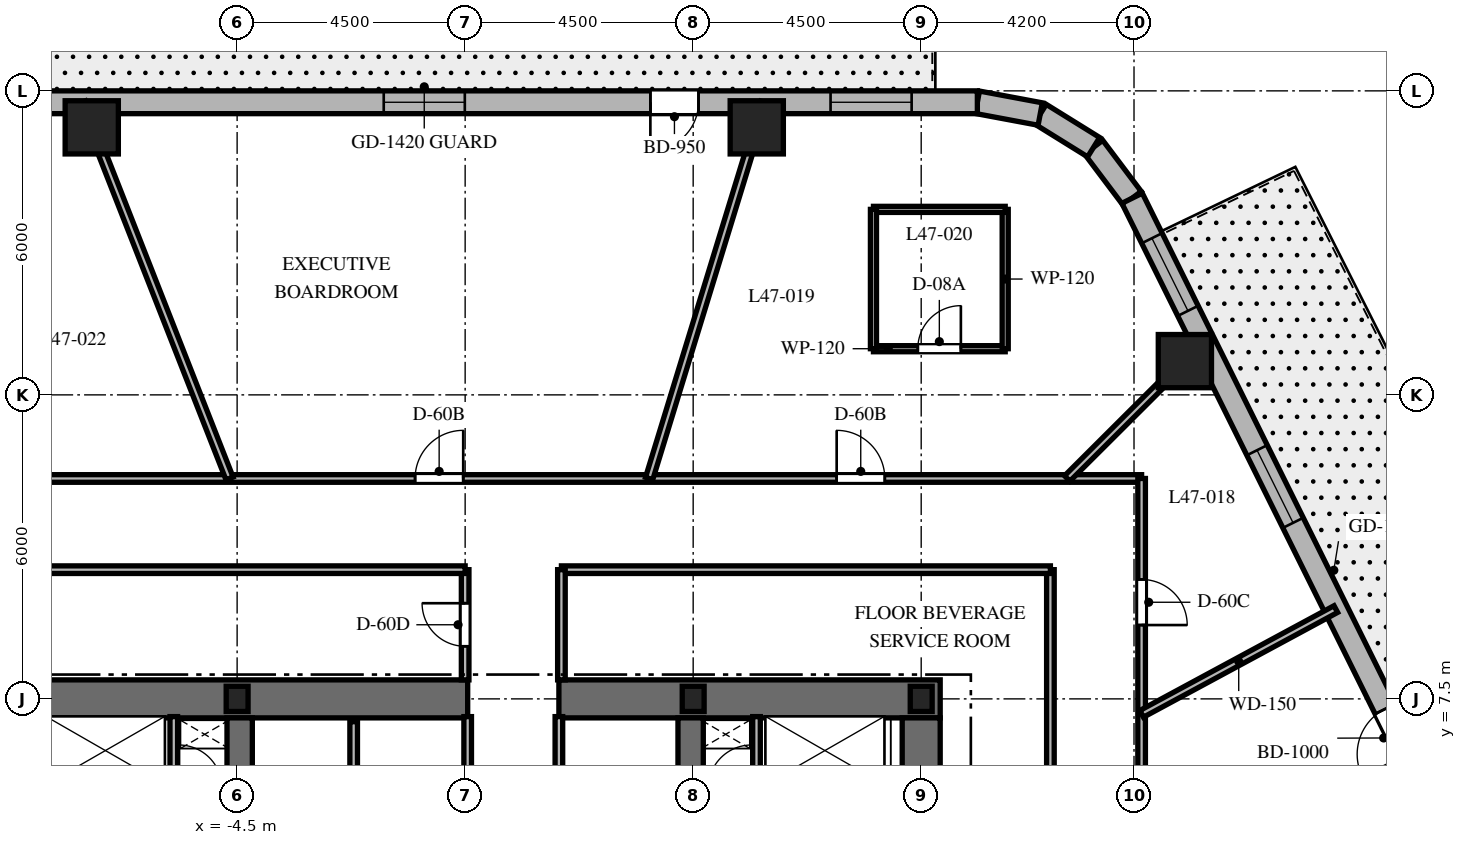
"""IFC4 building model, lengths in metres.
Left out: names, types, materials, properties, quantities, classifications, styles, units other than length and angle.
Written with IfcOpenShell. Run it as: python <this file> out.ifc"""

import sys

from ifc_helpers import new_model, si_unit, direction, frame, frame_2d, origin, origin_2d, place, context, subcontext, project, spatial, rectangle, i_section, extrude, element, fill, save


model = new_model("IFC4")
c1 = context("Model", 3, precision=1e-05, world=origin(), true_north=direction((0.0, 1.0)))
c2 = subcontext(c1, "Body", "Model", "MODEL_VIEW")
j1 = project(units=[si_unit("LENGTHUNIT", "METRE"), si_unit("PLANEANGLEUNIT", "RADIAN")], contexts=[c1])
p1 = place(None, origin())
s1 = spatial("IfcSite", under=j1, at=p1, CompositionType="ELEMENT")
p2 = place(p1, origin())
s2 = spatial("IfcBuilding", under=s1, at=p2, CompositionType="ELEMENT")
p3 = place(p2, frame((0.0, 0.0, 190.4)))
s3 = spatial("IfcBuildingStorey", under=s2, at=p3, CompositionType="ELEMENT", Elevation=190.4)
p4 = place(p3, frame((-9.375, 7.5, 0.0), z_axis=(0.0, 0.0, 1.0), x_axis=(1.0, 0.0, 0.0)))
e1 = element("IfcWall", 1, at=p4, inside=s3, PredefinedType="SHEAR", context=c2, shape_type="SweptSolid", body=[
    extrude(rectangle(XDim=9.425, YDim=0.75, at=frame_2d((4.712, 0.0))), origin(), (0.0, 0.0, 1.0), 3.7),
])
p5 = place(p3, frame((1.85, 7.5, 0.0), z_axis=(0.0, 0.0, 1.0), x_axis=(1.0, 0.0, 0.0)))
e2 = element("IfcWall", 2, at=p5, inside=s3, PredefinedType="SHEAR", context=c2, shape_type="SweptSolid", body=[
    extrude(rectangle(XDim=7.525, YDim=0.75, at=frame_2d((3.762, 0.0))), origin(), (0.0, 0.0, 1.0), 3.7),
])
p6 = place(p3, frame((9.0, -7.125, 0.0), z_axis=(0.0, 0.0, 1.0), x_axis=(0.0, 1.0, 0.0)))
e3 = element("IfcWall", 3, at=p6, inside=s3, PredefinedType="SHEAR", context=c2, shape_type="SweptSolid", body=[
    extrude(rectangle(XDim=14.25, YDim=0.75, at=frame_2d((7.125, 0.0))), origin(), (0.0, 0.0, 1.0), 3.7),
])
p7 = place(p6, frame((10.25, 0.0, 0.0)))
e4 = element("IfcOpeningElement", 4, at=p7, cuts=e3, PredefinedType="OPENING", context=c2, shape_type="SweptSolid", body=[
    extrude(rectangle(XDim=1.05, YDim=2.15, at=frame_2d((0.525, 1.075))), frame((0.0, 0.385, 0.0), z_axis=(0.0, -1.0, 0.0), x_axis=(1.0, 0.0, 0.0)), (0.0, 0.0, 1.0), 0.77),
])
for number, where, z_axis, x_axis in (
    (5, (-4.45, 2.25, 0.0), (0.0, 0.0, 1.0), (0.0, 1.0, 0.0)),
    (6, (4.45, 2.25, 0.0), (0.0, 0.0, 1.0), (0.0, 1.0, 0.0)),
):
    element("IfcWall", number, at=place(p3, frame(where, z_axis=z_axis, x_axis=x_axis)), inside=s3, PredefinedType="SHEAR", context=c2, shape_type="SweptSolid", body=[
        extrude(rectangle(XDim=4.875, YDim=0.5, at=frame_2d((2.438, 0.0))), origin(), (0.0, 0.0, 1.0), 3.7),
    ])
for number, where, z_axis, x_axis in (
    (7, (9.0, 7.5, 0.0), (0.0, 0.0, 1.0), (1.0, 0.0, 0.0)),
    (8, (4.5, 7.5, 0.0), (0.0, 0.0, 1.0), (1.0, 0.0, 0.0)),
    (9, (-4.5, 7.5, 0.0), (0.0, 0.0, 1.0), (1.0, 0.0, 0.0)),
):
    element("IfcColumn", number, at=place(p3, frame(where, z_axis=z_axis, x_axis=x_axis)), inside=s3, PredefinedType="COLUMN", context=c2, shape_type="SweptSolid", body=[
        extrude(i_section(OverallWidth=0.432, OverallDepth=0.498, WebThickness=0.056, FlangeThickness=0.089, at=origin_2d()), origin(), (0.0, 0.0, 1.0), 3.7),
    ])
for number, where, z_axis, x_axis in (
    (10, (14.204, 14.166, 0.0), (0.0, 0.0, 1.0), (1.0, 0.0, 0.0)),
    (11, (5.755, 18.78, 0.0), (0.0, 0.0, 1.0), (1.0, 0.0, 0.0)),
    (12, (-7.369, 18.78, 0.0), (0.0, 0.0, 1.0), (1.0, 0.0, 0.0)),
):
    element("IfcColumn", number, at=place(p3, frame(where, z_axis=z_axis, x_axis=x_axis)), inside=s3, PredefinedType="COLUMN", context=c2, shape_type="SweptSolid", body=[
        extrude(rectangle(XDim=1.05, YDim=1.05, at=origin_2d()), origin(), (0.0, 0.0, 1.0), 3.7),
    ])
p8 = place(p3, frame((13.162, 17.381, 0.0), z_axis=(0.0, 0.0, 1.0), x_axis=(-0.601515770517, 0.798860925205, 0.0)))
e13 = element("IfcWall", 13, at=p8, inside=s3, PredefinedType="SOLIDWALL", context=c2, shape_type="SweptSolid", body=[
    extrude(rectangle(XDim=1.262, YDim=0.45, at=frame_2d((0.631, 0.0))), origin(), (0.0, 0.0, 1.0), 3.4),
])
p9 = place(p3, frame((12.403, 18.389, 0.0), z_axis=(0.0, 0.0, 1.0), x_axis=(-0.849795170926, 0.527113049991, 0.0)))
e14 = element("IfcWall", 14, at=p9, inside=s3, PredefinedType="SOLIDWALL", context=c2, shape_type="SweptSolid", body=[
    extrude(rectangle(XDim=1.241, YDim=0.45, at=frame_2d((0.62, 0.0))), origin(), (0.0, 0.0, 1.0), 3.4),
])
p10 = place(p3, frame((11.349, 19.043, 0.0), z_axis=(0.0, 0.0, 1.0), x_axis=(-0.982931267051, 0.183973161772, 0.0)))
e15 = element("IfcWall", 15, at=p10, inside=s3, PredefinedType="SOLIDWALL", context=c2, shape_type="SweptSolid", body=[
    extrude(rectangle(XDim=1.262, YDim=0.45, at=frame_2d((0.631, 0.0))), origin(), (0.0, 0.0, 1.0), 3.4),
])
p11 = place(p3, frame((20.618, 2.344, 0.0), z_axis=(0.0, 0.0, 1.0), x_axis=(-0.444243691097, 0.895905990002, 0.0)))
e16 = element("IfcWall", 16, at=p11, inside=s3, PredefinedType="SOLIDWALL", context=c2, shape_type="SweptSolid", body=[
    extrude(rectangle(XDim=16.784, YDim=0.45, at=frame_2d((8.392, 0.0))), origin(), (0.0, 0.0, 1.0), 3.4),
])
p12 = place(p11, frame((4.535, 0.0, 0.0)))
e17 = element("IfcOpeningElement", 17, at=p12, cuts=e16, PredefinedType="OPENING", context=c2, shape_type="SweptSolid", body=[
    extrude(rectangle(XDim=1.0, YDim=2.15, at=frame_2d((0.5, 1.075))), frame((0.0, 0.235, 0.0), z_axis=(0.0, -1.0, 0.0), x_axis=(1.0, 0.0, 0.0)), (0.0, 0.0, 1.0), 0.47),
])
p13 = place(p11, frame((9.633, 0.0, 0.8)))
e18 = element("IfcOpeningElement", 18, at=p13, cuts=e16, PredefinedType="OPENING", context=c2, shape_type="SweptSolid", body=[
    extrude(rectangle(XDim=1.6, YDim=1.75, at=frame_2d((0.8, 0.875))), frame((0.0, 0.235, 0.0), z_axis=(0.0, -1.0, 0.0), x_axis=(1.0, 0.0, 0.0)), (0.0, 0.0, 1.0), 0.47),
])
p14 = place(p11, frame((14.303, 0.0, 0.8)))
e19 = element("IfcOpeningElement", 19, at=p14, cuts=e16, PredefinedType="OPENING", context=c2, shape_type="SweptSolid", body=[
    extrude(rectangle(XDim=1.6, YDim=1.75, at=frame_2d((0.8, 0.875))), frame((0.0, 0.235, 0.0), z_axis=(0.0, -1.0, 0.0), x_axis=(1.0, 0.0, 0.0)), (0.0, 0.0, 1.0), 0.47),
])
p15 = place(p11, frame((0.931, 0.0, 0.8)))
e20 = element("IfcOpeningElement", 20, at=p15, cuts=e16, PredefinedType="OPENING", context=c2, shape_type="SweptSolid", body=[
    extrude(rectangle(XDim=1.6, YDim=1.75, at=frame_2d((0.8, 0.875))), frame((0.0, 0.235, 0.0), z_axis=(0.0, -1.0, 0.0), x_axis=(1.0, 0.0, 0.0)), (0.0, 0.0, 1.0), 0.47),
])
p16 = place(p3, frame((10.108, 19.275, 0.0), z_axis=(0.0, 0.0, 1.0), x_axis=(-1.0, 0.0, 0.0)))
e21 = element("IfcWall", 21, at=p16, inside=s3, PredefinedType="SOLIDWALL", context=c2, shape_type="SweptSolid", body=[
    extrude(rectangle(XDim=21.829, YDim=0.45, at=frame_2d((10.915, 0.0))), origin(), (0.0, 0.0, 1.0), 3.4),
])
p17 = place(p16, frame((5.503, 0.0, 0.0)))
e22 = element("IfcOpeningElement", 22, at=p17, cuts=e21, PredefinedType="OPENING", context=c2, shape_type="SweptSolid", body=[
    extrude(rectangle(XDim=0.95, YDim=2.15, at=frame_2d((0.475, 1.075))), frame((0.0, 0.235, 0.0), z_axis=(0.0, -1.0, 0.0), x_axis=(1.0, 0.0, 0.0)), (0.0, 0.0, 1.0), 0.47),
])
p18 = place(p16, frame((1.297, 0.0, 0.8)))
e23 = element("IfcOpeningElement", 23, at=p18, cuts=e21, PredefinedType="OPENING", context=c2, shape_type="SweptSolid", body=[
    extrude(rectangle(XDim=1.6, YDim=1.75, at=frame_2d((0.8, 0.875))), frame((0.0, 0.235, 0.0), z_axis=(0.0, -1.0, 0.0), x_axis=(1.0, 0.0, 0.0)), (0.0, 0.0, 1.0), 0.47),
])
p19 = place(p16, frame((10.115, 0.0, 0.8)))
e24 = element("IfcOpeningElement", 24, at=p19, cuts=e21, PredefinedType="OPENING", context=c2, shape_type="SweptSolid", body=[
    extrude(rectangle(XDim=1.6, YDim=1.75, at=frame_2d((0.8, 0.875))), frame((0.0, 0.235, 0.0), z_axis=(0.0, -1.0, 0.0), x_axis=(1.0, 0.0, 0.0)), (0.0, 0.0, 1.0), 0.47),
])
p20 = place(p16, frame((18.933, 0.0, 0.8)))
e25 = element("IfcOpeningElement", 25, at=p20, cuts=e21, PredefinedType="OPENING", context=c2, shape_type="SweptSolid", body=[
    extrude(rectangle(XDim=1.6, YDim=1.75, at=frame_2d((0.8, 0.875))), frame((0.0, 0.235, 0.0), z_axis=(0.0, -1.0, 0.0), x_axis=(1.0, 0.0, 0.0)), (0.0, 0.0, 1.0), 0.47),
])
for number, where, z_axis, x_axis in (
    (26, (-5.75, 5.74, 0.0), (0.0, 0.0, 1.0), (0.0, 1.0, 0.0)),
    (27, (5.75, 5.74, 0.0), (0.0, 0.0, 1.0), (0.0, 1.0, 0.0)),
):
    element("IfcWall", number, at=place(p3, frame(where, z_axis=z_axis, x_axis=x_axis)), inside=s3, PredefinedType="PARTITIONING", context=c2, shape_type="SweptSolid", body=[
        extrude(rectangle(XDim=1.41, YDim=0.15, at=frame_2d((0.705, 0.0))), origin(), (0.0, 0.0, 1.0), 3.4),
    ])
p21 = place(p3, frame((-2.2, 5.2, 0.0), z_axis=(0.0, 0.0, 1.0), x_axis=(0.0, 1.0, 0.0)))
e28 = element("IfcWall", 28, at=p21, inside=s3, PredefinedType="PARTITIONING", context=c2, shape_type="SweptSolid", body=[
    extrude(rectangle(XDim=1.85, YDim=0.15, at=frame_2d((0.925, 0.0))), origin(), (0.0, 0.0, 1.0), 3.4),
])
for number, where, z_axis, x_axis in (
    (29, (0.05, 5.2, 0.0), (0.0, 0.0, 1.0), (0.0, 1.0, 0.0)),
    (30, (1.85, 5.2, 0.0), (0.0, 0.0, 1.0), (0.0, 1.0, 0.0)),
):
    element("IfcWall", number, at=place(p3, frame(where, z_axis=z_axis, x_axis=x_axis)), inside=s3, PredefinedType="PARTITIONING", context=c2, shape_type="SweptSolid", body=[
        extrude(rectangle(XDim=1.95, YDim=0.15, at=frame_2d((0.975, 0.0))), origin(), (0.0, 0.0, 1.0), 3.4),
    ])
p22 = place(p3, frame((-13.35, 11.85, 0.0), z_axis=(0.0, 0.0, 1.0), x_axis=(1.0, 0.0, 0.0)))
e31 = element("IfcWall", 31, at=p22, inside=s3, PredefinedType="PARTITIONING", context=c2, shape_type="SweptSolid", body=[
    extrude(rectangle(XDim=26.7, YDim=0.15, at=frame_2d((13.35, 0.0))), origin(), (0.0, 0.0, 1.0), 2.84),
])
p23 = place(p22, frame((20.682, 0.0, 0.0)))
e32 = element("IfcOpeningElement", 32, at=p23, cuts=e31, PredefinedType="OPENING", context=c2, shape_type="SweptSolid", body=[
    extrude(rectangle(XDim=0.95, YDim=2.03, at=frame_2d((0.475, 1.015))), frame((0.0, 0.085, 0.0), z_axis=(0.0, -1.0, 0.0), x_axis=(1.0, 0.0, 0.0)), (0.0, 0.0, 1.0), 0.17),
])
p24 = place(p22, frame((12.362, 0.0, 0.0)))
e33 = element("IfcOpeningElement", 33, at=p24, cuts=e31, PredefinedType="OPENING", context=c2, shape_type="SweptSolid", body=[
    extrude(rectangle(XDim=0.95, YDim=2.03, at=frame_2d((0.475, 1.015))), frame((0.0, 0.085, 0.0), z_axis=(0.0, -1.0, 0.0), x_axis=(1.0, 0.0, 0.0)), (0.0, 0.0, 1.0), 0.17),
])
p25 = place(p22, frame((3.995, 0.0, 0.0)))
e34 = element("IfcOpeningElement", 34, at=p25, cuts=e31, PredefinedType="OPENING", context=c2, shape_type="SweptSolid", body=[
    extrude(rectangle(XDim=0.95, YDim=2.03, at=frame_2d((0.475, 1.015))), frame((0.0, 0.085, 0.0), z_axis=(0.0, -1.0, 0.0), x_axis=(1.0, 0.0, 0.0)), (0.0, 0.0, 1.0), 0.17),
])
p26 = place(p3, frame((13.35, 11.85, 0.0), z_axis=(0.0, 0.0, 1.0), x_axis=(0.0, -1.0, 0.0)))
e35 = element("IfcWall", 35, at=p26, inside=s3, PredefinedType="PARTITIONING", context=c2, shape_type="SweptSolid", body=[
    extrude(rectangle(XDim=23.7, YDim=0.15, at=frame_2d((11.85, 0.0))), origin(), (0.0, 0.0, 1.0), 2.84),
])
p27 = place(p26, frame((5.951, 0.0, 0.0)))
e36 = element("IfcOpeningElement", 36, at=p27, cuts=e35, PredefinedType="OPENING", context=c2, shape_type="SweptSolid", body=[
    extrude(rectangle(XDim=0.9, YDim=2.03, at=frame_2d((0.45, 1.015))), frame((0.0, 0.085, 0.0), z_axis=(0.0, -1.0, 0.0), x_axis=(1.0, 0.0, 0.0)), (0.0, 0.0, 1.0), 0.17),
])
p28 = place(p26, frame((1.993, 0.0, 0.0)))
e37 = element("IfcOpeningElement", 37, at=p28, cuts=e35, PredefinedType="OPENING", context=c2, shape_type="SweptSolid", body=[
    extrude(rectangle(XDim=0.9, YDim=2.03, at=frame_2d((0.45, 1.015))), frame((0.0, 0.085, 0.0), z_axis=(0.0, -1.0, 0.0), x_axis=(1.0, 0.0, 0.0)), (0.0, 0.0, 1.0), 0.17),
])
p29 = place(p26, frame((18.364, 0.0, 0.0)))
e38 = element("IfcOpeningElement", 38, at=p29, cuts=e35, PredefinedType="OPENING", context=c2, shape_type="SweptSolid", body=[
    extrude(rectangle(XDim=1.0, YDim=2.03, at=frame_2d((0.5, 1.015))), frame((0.0, 0.085, 0.0), z_axis=(0.0, -1.0, 0.0), x_axis=(1.0, 0.0, 0.0)), (0.0, 0.0, 1.0), 0.17),
])
p30 = place(p3, frame((11.55, 4.6, 0.0), z_axis=(0.0, 0.0, 1.0), x_axis=(0.0, 1.0, 0.0)))
e39 = element("IfcWall", 39, at=p30, inside=s3, PredefinedType="PARTITIONING", context=c2, shape_type="SweptSolid", body=[
    extrude(rectangle(XDim=5.45, YDim=0.15, at=frame_2d((2.725, 0.0))), origin(), (0.0, 0.0, 1.0), 2.84),
])
p31 = place(p3, frame((11.55, 10.05, 0.0), z_axis=(0.0, 0.0, 1.0), x_axis=(-1.0, 0.0, 0.0)))
e40 = element("IfcWall", 40, at=p31, inside=s3, PredefinedType="PARTITIONING", context=c2, shape_type="SweptSolid", body=[
    extrude(rectangle(XDim=9.65, YDim=0.15, at=frame_2d((4.825, 0.0))), origin(), (0.0, 0.0, 1.0), 2.84),
])
p32 = place(p3, frame((1.9, 10.05, 0.0), z_axis=(0.0, 0.0, 1.0), x_axis=(0.0, -1.0, 0.0)))
e41 = element("IfcWall", 41, at=p32, inside=s3, PredefinedType="PARTITIONING", context=c2, shape_type="SweptSolid", body=[
    extrude(rectangle(XDim=2.175, YDim=0.15, at=frame_2d((1.087, 0.0))), origin(), (0.0, 0.0, 1.0), 3.4),
])
p33 = place(p3, frame((0.0, 7.875, 0.0), z_axis=(0.0, 0.0, 1.0), x_axis=(0.0, 1.0, 0.0)))
e42 = element("IfcWall", 42, at=p33, inside=s3, PredefinedType="PARTITIONING", context=c2, shape_type="SweptSolid", body=[
    extrude(rectangle(XDim=2.175, YDim=0.15, at=frame_2d((1.087, 0.0))), origin(), (0.0, 0.0, 1.0), 3.4),
])
p34 = place(p33, frame((0.663, 0.0, 0.0)))
e43 = element("IfcOpeningElement", 43, at=p34, cuts=e42, PredefinedType="OPENING", context=c2, shape_type="SweptSolid", body=[
    extrude(rectangle(XDim=0.85, YDim=2.03, at=frame_2d((0.425, 1.015))), frame((0.0, 0.085, 0.0), z_axis=(0.0, -1.0, 0.0), x_axis=(1.0, 0.0, 0.0)), (0.0, 0.0, 1.0), 0.17),
])
p35 = place(p3, frame((0.0, 10.05, 0.0), z_axis=(0.0, 0.0, 1.0), x_axis=(-1.0, 0.0, 0.0)))
e44 = element("IfcWall", 44, at=p35, inside=s3, PredefinedType="PARTITIONING", context=c2, shape_type="SweptSolid", body=[
    extrude(rectangle(XDim=11.55, YDim=0.15, at=frame_2d((5.775, 0.0))), origin(), (0.0, 0.0, 1.0), 2.84),
])
p36 = place(p3, frame((13.35, 7.204, 0.0), z_axis=(0.0, 0.0, 1.0), x_axis=(0.880033329067, 0.474911928394, 0.0)))
e45 = element("IfcWall", 45, at=p36, inside=s3, PredefinedType="PARTITIONING", context=c2, shape_type="SweptSolid", body=[
    extrude(rectangle(XDim=4.355, YDim=0.15, at=frame_2d((2.178, 0.0))), origin(), (0.0, 0.0, 1.0), 2.64),
])
p37 = place(p3, frame((11.882, 11.85, 0.0), z_axis=(0.0, 0.0, 1.0), x_axis=(0.708037373639, 0.706174962407, 0.0)))
e46 = element("IfcWall", 46, at=p37, inside=s3, PredefinedType="PARTITIONING", context=c2, shape_type="SweptSolid", body=[
    extrude(rectangle(XDim=3.802, YDim=0.15, at=frame_2d((1.901, 0.0))), origin(), (0.0, 0.0, 1.0), 2.64),
])
p38 = place(p3, frame((3.631, 11.85, 0.0), z_axis=(0.0, 0.0, 1.0), x_axis=(0.293007573338, 0.956110120209, 0.0)))
e47 = element("IfcWall", 47, at=p38, inside=s3, PredefinedType="PARTITIONING", context=c2, shape_type="SweptSolid", body=[
    extrude(rectangle(XDim=7.766, YDim=0.15, at=frame_2d((3.883, 0.0))), origin(), (0.0, 0.0, 1.0), 2.64),
])
p39 = place(p3, frame((-4.65, 11.85, 0.0), z_axis=(0.0, 0.0, 1.0), x_axis=(-0.365265947993, 0.930903210456, 0.0)))
e48 = element("IfcWall", 48, at=p39, inside=s3, PredefinedType="PARTITIONING", context=c2, shape_type="SweptSolid", body=[
    extrude(rectangle(XDim=7.976, YDim=0.15, at=frame_2d((3.988, 0.0))), origin(), (0.0, 0.0, 1.0), 2.64),
])
p40 = place(p3, frame((8.058, 14.411, 0.0), z_axis=(0.0, 0.0, 1.0), x_axis=(1.0, 0.0, 0.0)))
e49 = element("IfcWall", 49, at=p40, inside=s3, PredefinedType="PARTITIONING", context=c2, shape_type="SweptSolid", body=[
    extrude(rectangle(XDim=2.6, YDim=0.12, at=frame_2d((1.3, 0.0))), origin(), (0.0, 0.0, 1.0), 3.4),
])
p41 = place(p40, frame((0.875, 0.0, 0.0)))
e50 = element("IfcOpeningElement", 50, at=p41, cuts=e49, PredefinedType="OPENING", context=c2, shape_type="SweptSolid", body=[
    extrude(rectangle(XDim=0.85, YDim=2.03, at=frame_2d((0.425, 1.015))), frame((0.0, 0.07, 0.0), z_axis=(0.0, -1.0, 0.0), x_axis=(1.0, 0.0, 0.0)), (0.0, 0.0, 1.0), 0.14),
])
p42 = place(p3, frame((10.658, 14.411, 0.0), z_axis=(0.0, 0.0, 1.0), x_axis=(0.0, 1.0, 0.0)))
e51 = element("IfcWall", 51, at=p42, inside=s3, PredefinedType="PARTITIONING", context=c2, shape_type="SweptSolid", body=[
    extrude(rectangle(XDim=2.75, YDim=0.12, at=frame_2d((1.375, 0.0))), origin(), (0.0, 0.0, 1.0), 2.64),
])
p43 = place(p3, frame((10.658, 17.161, 0.0), z_axis=(0.0, 0.0, 1.0), x_axis=(-1.0, 0.0, 0.0)))
e52 = element("IfcWall", 52, at=p43, inside=s3, PredefinedType="PARTITIONING", context=c2, shape_type="SweptSolid", body=[
    extrude(rectangle(XDim=2.6, YDim=0.12, at=frame_2d((1.3, 0.0))), origin(), (0.0, 0.0, 1.0), 2.64),
])
p44 = place(p3, frame((8.058, 17.161, 0.0), z_axis=(0.0, 0.0, 1.0), x_axis=(0.0, -1.0, 0.0)))
e53 = element("IfcWall", 53, at=p44, inside=s3, PredefinedType="PARTITIONING", context=c2, shape_type="SweptSolid", body=[
    extrude(rectangle(XDim=2.75, YDim=0.12, at=frame_2d((1.375, 0.0))), origin(), (0.0, 0.0, 1.0), 3.4),
])
p45 = place(p12, origin())
e54 = element("IfcDoor", 54, at=p45, inside=s3, OperationType="SINGLE_SWING_LEFT", PredefinedType="DOOR", context=c2, shape_type="SweptSolid", body=[
    extrude(rectangle(XDim=1.0, YDim=2.15, at=frame_2d((0.5, 1.075))), frame((0.0, 0.025, 0.0), z_axis=(0.0, -1.0, 0.0), x_axis=(1.0, 0.0, 0.0)), (0.0, 0.0, 1.0), 0.05),
])
fill(e17, e54)
p46 = place(p13, origin())
e55 = element("IfcWindow", 55, at=p46, inside=s3, PartitioningType="SINGLE_PANEL", PredefinedType="WINDOW", context=c2, shape_type="SweptSolid", body=[
    extrude(rectangle(XDim=1.6, YDim=1.75, at=frame_2d((0.8, 0.875))), frame((0.0, 0.03, 0.0), z_axis=(0.0, -1.0, 0.0), x_axis=(1.0, 0.0, 0.0)), (0.0, 0.0, 1.0), 0.06),
])
fill(e18, e55)
p47 = place(p14, origin())
e56 = element("IfcWindow", 56, at=p47, inside=s3, PartitioningType="SINGLE_PANEL", PredefinedType="WINDOW", context=c2, shape_type="SweptSolid", body=[
    extrude(rectangle(XDim=1.6, YDim=1.75, at=frame_2d((0.8, 0.875))), frame((0.0, 0.03, 0.0), z_axis=(0.0, -1.0, 0.0), x_axis=(1.0, 0.0, 0.0)), (0.0, 0.0, 1.0), 0.06),
])
fill(e19, e56)
p48 = place(p17, origin())
e57 = element("IfcDoor", 57, at=p48, inside=s3, OperationType="SINGLE_SWING_RIGHT", PredefinedType="DOOR", context=c2, shape_type="SweptSolid", body=[
    extrude(rectangle(XDim=0.95, YDim=2.15, at=frame_2d((0.475, 1.075))), frame((0.0, 0.025, 0.0), z_axis=(0.0, -1.0, 0.0), x_axis=(1.0, 0.0, 0.0)), (0.0, 0.0, 1.0), 0.05),
])
fill(e22, e57)
p49 = place(p18, origin())
e58 = element("IfcWindow", 58, at=p49, inside=s3, PartitioningType="SINGLE_PANEL", PredefinedType="WINDOW", context=c2, shape_type="SweptSolid", body=[
    extrude(rectangle(XDim=1.6, YDim=1.75, at=frame_2d((0.8, 0.875))), frame((0.0, 0.03, 0.0), z_axis=(0.0, -1.0, 0.0), x_axis=(1.0, 0.0, 0.0)), (0.0, 0.0, 1.0), 0.06),
])
fill(e23, e58)
p50 = place(p19, origin())
e59 = element("IfcWindow", 59, at=p50, inside=s3, PartitioningType="SINGLE_PANEL", PredefinedType="WINDOW", context=c2, shape_type="SweptSolid", body=[
    extrude(rectangle(XDim=1.6, YDim=1.75, at=frame_2d((0.8, 0.875))), frame((0.0, 0.03, 0.0), z_axis=(0.0, -1.0, 0.0), x_axis=(1.0, 0.0, 0.0)), (0.0, 0.0, 1.0), 0.06),
])
fill(e24, e59)
p51 = place(p34, origin())
e60 = element("IfcDoor", 60, at=p51, inside=s3, OperationType="SINGLE_SWING_RIGHT", PredefinedType="DOOR", context=c2, shape_type="SweptSolid", body=[
    extrude(rectangle(XDim=0.85, YDim=2.03, at=frame_2d((0.425, 1.015))), frame((0.0, 0.025, 0.0), z_axis=(0.0, -1.0, 0.0), x_axis=(1.0, 0.0, 0.0)), (0.0, 0.0, 1.0), 0.05),
])
fill(e43, e60)
p52 = place(p28, origin())
e61 = element("IfcDoor", 61, at=p52, inside=s3, OperationType="SINGLE_SWING_RIGHT", PredefinedType="DOOR", context=c2, shape_type="SweptSolid", body=[
    extrude(rectangle(XDim=0.9, YDim=2.03, at=frame_2d((0.45, 1.015))), frame((0.0, 0.025, 0.0), z_axis=(0.0, -1.0, 0.0), x_axis=(1.0, 0.0, 0.0)), (0.0, 0.0, 1.0), 0.05),
])
fill(e37, e61)
p53 = place(p23, origin())
e62 = element("IfcDoor", 62, at=p53, inside=s3, OperationType="SINGLE_SWING_LEFT", PredefinedType="DOOR", context=c2, shape_type="SweptSolid", body=[
    extrude(rectangle(XDim=0.95, YDim=2.03, at=frame_2d((0.475, 1.015))), frame((0.0, 0.025, 0.0), z_axis=(0.0, -1.0, 0.0), x_axis=(1.0, 0.0, 0.0)), (0.0, 0.0, 1.0), 0.05),
])
fill(e32, e62)
p54 = place(p41, origin())
e63 = element("IfcDoor", 63, at=p54, inside=s3, OperationType="SINGLE_SWING_RIGHT", PredefinedType="DOOR", context=c2, shape_type="SweptSolid", body=[
    extrude(rectangle(XDim=0.85, YDim=2.03, at=frame_2d((0.425, 1.015))), frame((0.0, 0.025, 0.0), z_axis=(0.0, -1.0, 0.0), x_axis=(1.0, 0.0, 0.0)), (0.0, 0.0, 1.0), 0.05),
])
fill(e50, e63)
p55 = place(p24, origin())
e64 = element("IfcDoor", 64, at=p55, inside=s3, OperationType="SINGLE_SWING_RIGHT", PredefinedType="DOOR", context=c2, shape_type="SweptSolid", body=[
    extrude(rectangle(XDim=0.95, YDim=2.03, at=frame_2d((0.475, 1.015))), frame((0.0, 0.025, 0.0), z_axis=(0.0, -1.0, 0.0), x_axis=(1.0, 0.0, 0.0)), (0.0, 0.0, 1.0), 0.05),
])
fill(e33, e64)
save(model, sys.argv[1])
